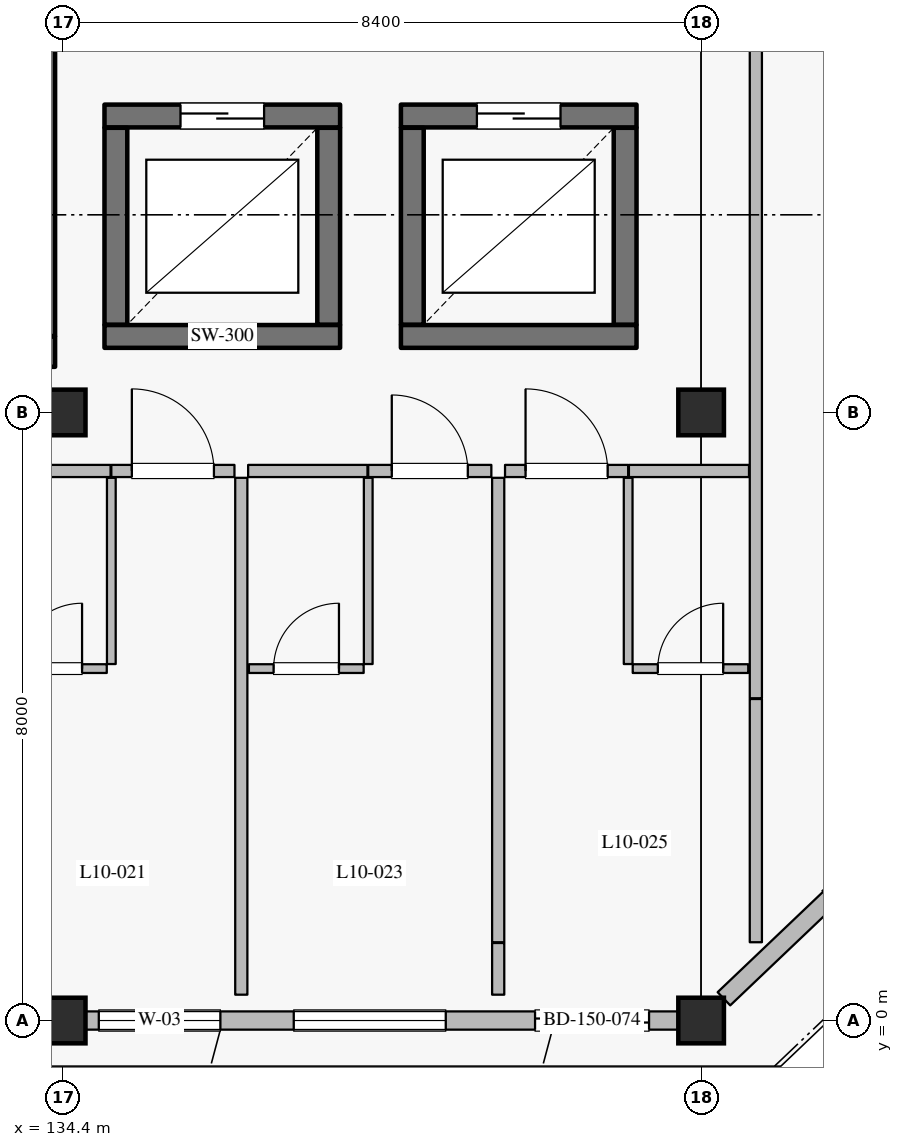
"""IFC4 building model, lengths in metres.
Left out: names, types, materials, properties, quantities, classifications, styles, units other than length and angle.
Written with IfcOpenShell. Run it as: python <this file> out.ifc"""

import sys

from ifc_helpers import new_model, si_unit, direction, frame, frame_2d, origin, origin_2d, place, context, subcontext, project, spatial, rectangle, extrude, element, fill, save


model = new_model("IFC4")
c1 = context("Model", 3, precision=1e-05, world=origin(), true_north=direction((0.0, 1.0)))
c2 = subcontext(c1, "Body", "Model", "MODEL_VIEW")
j1 = project(units=[si_unit("LENGTHUNIT", "METRE"), si_unit("PLANEANGLEUNIT", "RADIAN")], contexts=[c1])
p1 = place(None, origin())
s1 = spatial("IfcSite", under=j1, at=p1, CompositionType="ELEMENT")
p2 = place(p1, origin())
s2 = spatial("IfcBuilding", under=s1, at=p2, CompositionType="ELEMENT")
p3 = place(p2, frame((0.0, 0.0, 43.2)))
s3 = spatial("IfcBuildingStorey", under=s2, at=p3, CompositionType="ELEMENT", Elevation=43.2)
for number, where, z_axis, x_axis in (
    (1, (134.4, 0.0, 0.0), (0.0, 0.0, 1.0), (1.0, 0.0, 0.0)),
    (2, (142.8, 0.0, 0.0), (0.0, 0.0, 1.0), (1.0, 0.0, 0.0)),
    (3, (134.4, 8.0, 0.0), (0.0, 0.0, 1.0), (1.0, 0.0, 0.0)),
    (4, (142.8, 8.0, 0.0), (0.0, 0.0, 1.0), (1.0, 0.0, 0.0)),
):
    element("IfcColumn", number, at=place(p3, frame(where, z_axis=z_axis, x_axis=x_axis)), inside=s3, PredefinedType="COLUMN", context=c2, shape_type="SweptSolid", body=[
        extrude(rectangle(XDim=0.6, YDim=0.6, at=origin_2d()), origin(), (0.0, 0.0, 1.0), 4.2),
    ])
p4 = place(p3, frame((142.5, 0.0, 0.0), z_axis=(0.0, 0.0, 1.0), x_axis=(-1.0, 0.0, 0.0)))
e5 = element("IfcWall", 5, at=p4, inside=s3, PredefinedType="SOLIDWALL", context=c2, shape_type="SweptSolid", body=[
    extrude(rectangle(XDim=7.8, YDim=0.24, at=frame_2d((3.9, 0.0))), origin(), (0.0, 0.0, 1.0), 3.54),
])
p5 = place(p4, frame((0.385, 0.0, 0.0)))
e6 = element("IfcOpeningElement", 6, at=p5, cuts=e5, PredefinedType="OPENING", context=c2, shape_type="SweptSolid", body=[
    extrude(rectangle(XDim=1.5, YDim=2.25, at=frame_2d((0.75, 1.125))), frame((0.0, 0.13, 0.0), z_axis=(0.0, -1.0, 0.0), x_axis=(1.0, 0.0, 0.0)), (0.0, 0.0, 1.0), 0.26),
])
p6 = place(p4, frame((3.06, 0.0, 0.8)))
e7 = element("IfcOpeningElement", 7, at=p6, cuts=e5, PredefinedType="OPENING", context=c2, shape_type="SweptSolid", body=[
    extrude(rectangle(XDim=2.0, YDim=1.75, at=frame_2d((1.0, 0.875))), frame((0.0, 0.13, 0.0), z_axis=(0.0, -1.0, 0.0), x_axis=(1.0, 0.0, 0.0)), (0.0, 0.0, 1.0), 0.26),
])
p7 = place(p4, frame((6.025, 0.0, 0.8)))
e8 = element("IfcOpeningElement", 8, at=p7, cuts=e5, PredefinedType="OPENING", context=c2, shape_type="SweptSolid", body=[
    extrude(rectangle(XDim=1.6, YDim=1.6, at=frame_2d((0.8, 0.8))), frame((0.0, 0.13, 0.0), z_axis=(0.0, -1.0, 0.0), x_axis=(1.0, 0.0, 0.0)), (0.0, 0.0, 1.0), 0.26),
])
p8 = place(p3, frame((150.9, 7.714, 0.0), z_axis=(0.0, 0.0, 1.0), x_axis=(-0.724145477467, -0.689647248573, 0.0)))
e9 = element("IfcWall", 9, at=p8, inside=s3, PredefinedType="SOLIDWALL", context=c2, shape_type="SweptSolid", body=[
    extrude(rectangle(XDim=10.771, YDim=0.24, at=frame_2d((5.385, 0.0))), origin(), (0.0, 0.0, 1.0), 3.54),
])
p9 = place(p8, frame((2.44, 0.0, 0.0)))
e10 = element("IfcOpeningElement", 10, at=p9, cuts=e9, PredefinedType="OPENING", context=c2, shape_type="SweptSolid", body=[
    extrude(rectangle(XDim=1.5, YDim=2.25, at=frame_2d((0.75, 1.125))), frame((0.0, 0.13, 0.0), z_axis=(0.0, -1.0, 0.0), x_axis=(1.0, 0.0, 0.0)), (0.0, 0.0, 1.0), 0.26),
])
p10 = place(p8, frame((6.857, 0.0, 0.8)))
e11 = element("IfcOpeningElement", 11, at=p10, cuts=e9, PredefinedType="OPENING", context=c2, shape_type="SweptSolid", body=[
    extrude(rectangle(XDim=2.0, YDim=1.75, at=frame_2d((1.0, 0.875))), frame((0.0, 0.13, 0.0), z_axis=(0.0, -1.0, 0.0), x_axis=(1.0, 0.0, 0.0)), (0.0, 0.0, 1.0), 0.26),
])
p11 = place(p3, frame((134.95, 9.0, 0.0), z_axis=(0.0, 0.0, 1.0), x_axis=(1.0, 0.0, 0.0)))
e12 = element("IfcWall", 12, at=p11, inside=s3, PredefinedType="SHEAR", context=c2, shape_type="SweptSolid", body=[
    extrude(rectangle(XDim=3.1, YDim=0.3, at=frame_2d((1.55, 0.0))), origin(), (0.0, 0.0, 1.0), 3.935),
])
p12 = place(p3, frame((137.9, 9.155, 0.0), z_axis=(0.0, 0.0, 1.0), x_axis=(0.0, 1.0, 0.0)))
e13 = element("IfcWall", 13, at=p12, inside=s3, PredefinedType="SHEAR", context=c2, shape_type="SweptSolid", body=[
    extrude(rectangle(XDim=2.59, YDim=0.3, at=frame_2d((1.295, 0.0))), origin(), (0.0, 0.0, 1.0), 3.935),
])
p13 = place(p3, frame((138.05, 11.9, 0.0), z_axis=(0.0, 0.0, 1.0), x_axis=(-1.0, 0.0, 0.0)))
e14 = element("IfcWall", 14, at=p13, inside=s3, PredefinedType="SHEAR", context=c2, shape_type="SweptSolid", body=[
    extrude(rectangle(XDim=3.1, YDim=0.3, at=frame_2d((1.55, 0.0))), origin(), (0.0, 0.0, 1.0), 3.935),
])
p14 = place(p13, frame((1.0, 0.0, 0.0)))
e15 = element("IfcOpeningElement", 15, at=p14, cuts=e14, PredefinedType="OPENING", context=c2, shape_type="SweptSolid", body=[
    extrude(rectangle(XDim=1.1, YDim=2.2, at=frame_2d((0.55, 1.1))), frame((0.0, 0.16, 0.0), z_axis=(0.0, -1.0, 0.0), x_axis=(1.0, 0.0, 0.0)), (0.0, 0.0, 1.0), 0.32),
])
p15 = place(p3, frame((135.1, 11.745, 0.0), z_axis=(0.0, 0.0, 1.0), x_axis=(0.0, -1.0, 0.0)))
e16 = element("IfcWall", 16, at=p15, inside=s3, PredefinedType="SHEAR", context=c2, shape_type="SweptSolid", body=[
    extrude(rectangle(XDim=2.59, YDim=0.3, at=frame_2d((1.295, 0.0))), origin(), (0.0, 0.0, 1.0), 3.935),
])
p16 = place(p3, frame((138.85, 9.0, 0.0), z_axis=(0.0, 0.0, 1.0), x_axis=(1.0, 0.0, 0.0)))
e17 = element("IfcWall", 17, at=p16, inside=s3, PredefinedType="SHEAR", context=c2, shape_type="SweptSolid", body=[
    extrude(rectangle(XDim=3.1, YDim=0.3, at=frame_2d((1.55, 0.0))), origin(), (0.0, 0.0, 1.0), 3.935),
])
p17 = place(p3, frame((141.8, 9.155, 0.0), z_axis=(0.0, 0.0, 1.0), x_axis=(0.0, 1.0, 0.0)))
e18 = element("IfcWall", 18, at=p17, inside=s3, PredefinedType="SHEAR", context=c2, shape_type="SweptSolid", body=[
    extrude(rectangle(XDim=2.59, YDim=0.3, at=frame_2d((1.295, 0.0))), origin(), (0.0, 0.0, 1.0), 3.935),
])
p18 = place(p3, frame((141.95, 11.9, 0.0), z_axis=(0.0, 0.0, 1.0), x_axis=(-1.0, 0.0, 0.0)))
e19 = element("IfcWall", 19, at=p18, inside=s3, PredefinedType="SHEAR", context=c2, shape_type="SweptSolid", body=[
    extrude(rectangle(XDim=3.1, YDim=0.3, at=frame_2d((1.55, 0.0))), origin(), (0.0, 0.0, 1.0), 3.935),
])
p19 = place(p18, frame((1.0, 0.0, 0.0)))
e20 = element("IfcOpeningElement", 20, at=p19, cuts=e19, PredefinedType="OPENING", context=c2, shape_type="SweptSolid", body=[
    extrude(rectangle(XDim=1.1, YDim=2.2, at=frame_2d((0.55, 1.1))), frame((0.0, 0.16, 0.0), z_axis=(0.0, -1.0, 0.0), x_axis=(1.0, 0.0, 0.0)), (0.0, 0.0, 1.0), 0.32),
])
p20 = place(p3, frame((139.0, 11.745, 0.0), z_axis=(0.0, 0.0, 1.0), x_axis=(0.0, -1.0, 0.0)))
e21 = element("IfcWall", 21, at=p20, inside=s3, PredefinedType="SHEAR", context=c2, shape_type="SweptSolid", body=[
    extrude(rectangle(XDim=2.59, YDim=0.3, at=frame_2d((1.295, 0.0))), origin(), (0.0, 0.0, 1.0), 3.935),
])
p21 = place(p3, frame((126.15, 8.8, 0.0), z_axis=(0.0, 0.0, 1.0), x_axis=(1.0, 0.0, 0.0)))
e22 = element("IfcWall", 22, at=p21, inside=s3, PredefinedType="SHEAR", context=c2, shape_type="SweptSolid", body=[
    extrude(rectangle(XDim=8.15, YDim=0.4, at=frame_2d((4.075, 0.0))), origin(), (0.0, 0.0, 1.0), 3.935),
])
p22 = place(p3, frame((134.1, 9.005, 0.0), z_axis=(0.0, 0.0, 1.0), x_axis=(0.0, 1.0, 0.0)))
e23 = element("IfcWall", 23, at=p22, inside=s3, PredefinedType="SHEAR", context=c2, shape_type="SweptSolid", body=[
    extrude(rectangle(XDim=3.95, YDim=0.4, at=frame_2d((1.975, 0.0))), origin(), (0.0, 0.0, 1.0), 3.935),
])
p23 = place(p3, frame((133.46, 7.23, 0.0), z_axis=(0.0, 0.0, 1.0), x_axis=(1.0, 0.0, 0.0)))
e24 = element("IfcWall", 24, at=p23, inside=s3, PredefinedType="PARTITIONING", context=c2, shape_type="SweptSolid", body=[
    extrude(rectangle(XDim=1.57, YDim=0.16, at=frame_2d((0.785, 0.0))), origin(), (0.0, 0.0, 1.0), 3.935),
])
p24 = place(p3, frame((135.04, 7.23, 0.0), z_axis=(0.0, 0.0, 1.0), x_axis=(1.0, 0.0, 0.0)))
e25 = element("IfcWall", 25, at=p24, inside=s3, PredefinedType="PARTITIONING", context=c2, shape_type="SweptSolid", body=[
    extrude(rectangle(XDim=1.62, YDim=0.16, at=frame_2d((0.81, 0.0))), origin(), (0.0, 0.0, 1.0), 3.935),
])
p25 = place(p24, frame((0.27, 0.0, 0.0)))
e26 = element("IfcOpeningElement", 26, at=p25, cuts=e25, PredefinedType="OPENING", context=c2, shape_type="SweptSolid", body=[
    extrude(rectangle(XDim=1.08, YDim=2.3, at=frame_2d((0.54, 1.15))), frame((0.0, 0.09, 0.0), z_axis=(0.0, -1.0, 0.0), x_axis=(1.0, 0.0, 0.0)), (0.0, 0.0, 1.0), 0.18),
])
p26 = place(p3, frame((135.04, 4.69, 0.0), z_axis=(0.0, 0.0, 1.0), x_axis=(0.0, 1.0, 0.0)))
e27 = element("IfcWall", 27, at=p26, inside=s3, PredefinedType="PARTITIONING", context=c2, shape_type="SweptSolid", body=[
    extrude(rectangle(XDim=2.45, YDim=0.115, at=frame_2d((1.225, 0.0))), origin(), (0.0, 0.0, 1.0), 3.935),
])
p27 = place(p3, frame((133.47, 4.63, 0.0), z_axis=(0.0, 0.0, 1.0), x_axis=(1.0, 0.0, 0.0)))
e28 = element("IfcWall", 28, at=p27, inside=s3, PredefinedType="PARTITIONING", context=c2, shape_type="SweptSolid", body=[
    extrude(rectangle(XDim=1.51, YDim=0.115, at=frame_2d((0.755, 0.0))), origin(), (0.0, 0.0, 1.0), 3.935),
])
p28 = place(p27, frame((0.325, 0.0, 0.0)))
e29 = element("IfcOpeningElement", 29, at=p28, cuts=e28, PredefinedType="OPENING", context=c2, shape_type="SweptSolid", body=[
    extrude(rectangle(XDim=0.86, YDim=2.12, at=frame_2d((0.43, 1.06))), frame((0.0, 0.067, 0.0), z_axis=(0.0, -1.0, 0.0), x_axis=(1.0, 0.0, 0.0)), (0.0, 0.0, 1.0), 0.135),
])
p29 = place(p3, frame((136.84, 7.23, 0.0), z_axis=(0.0, 0.0, 1.0), x_axis=(1.0, 0.0, 0.0)))
e30 = element("IfcWall", 30, at=p29, inside=s3, PredefinedType="PARTITIONING", context=c2, shape_type="SweptSolid", body=[
    extrude(rectangle(XDim=1.57, YDim=0.16, at=frame_2d((0.785, 0.0))), origin(), (0.0, 0.0, 1.0), 3.935),
])
p30 = place(p3, frame((138.42, 7.23, 0.0), z_axis=(0.0, 0.0, 1.0), x_axis=(1.0, 0.0, 0.0)))
e31 = element("IfcWall", 31, at=p30, inside=s3, PredefinedType="PARTITIONING", context=c2, shape_type="SweptSolid", body=[
    extrude(rectangle(XDim=1.62, YDim=0.16, at=frame_2d((0.81, 0.0))), origin(), (0.0, 0.0, 1.0), 3.935),
])
p31 = place(p30, frame((0.31, 0.0, 0.0)))
e32 = element("IfcOpeningElement", 32, at=p31, cuts=e31, PredefinedType="OPENING", context=c2, shape_type="SweptSolid", body=[
    extrude(rectangle(XDim=1.0, YDim=2.25, at=frame_2d((0.5, 1.125))), frame((0.0, 0.09, 0.0), z_axis=(0.0, -1.0, 0.0), x_axis=(1.0, 0.0, 0.0)), (0.0, 0.0, 1.0), 0.18),
])
p32 = place(p3, frame((138.42, 4.69, 0.0), z_axis=(0.0, 0.0, 1.0), x_axis=(0.0, 1.0, 0.0)))
e33 = element("IfcWall", 33, at=p32, inside=s3, PredefinedType="PARTITIONING", context=c2, shape_type="SweptSolid", body=[
    extrude(rectangle(XDim=2.45, YDim=0.115, at=frame_2d((1.225, 0.0))), origin(), (0.0, 0.0, 1.0), 3.935),
])
p33 = place(p3, frame((136.85, 4.63, 0.0), z_axis=(0.0, 0.0, 1.0), x_axis=(1.0, 0.0, 0.0)))
e34 = element("IfcWall", 34, at=p33, inside=s3, PredefinedType="PARTITIONING", context=c2, shape_type="SweptSolid", body=[
    extrude(rectangle(XDim=1.51, YDim=0.115, at=frame_2d((0.755, 0.0))), origin(), (0.0, 0.0, 1.0), 3.935),
])
p34 = place(p33, frame((0.325, 0.0, 0.0)))
e35 = element("IfcOpeningElement", 35, at=p34, cuts=e34, PredefinedType="OPENING", context=c2, shape_type="SweptSolid", body=[
    extrude(rectangle(XDim=0.86, YDim=2.12, at=frame_2d((0.43, 1.06))), frame((0.0, 0.067, 0.0), z_axis=(0.0, -1.0, 0.0), x_axis=(1.0, 0.0, 0.0)), (0.0, 0.0, 1.0), 0.135),
])
p35 = place(p3, frame((136.75, 0.34, 0.0), z_axis=(0.0, 0.0, 1.0), x_axis=(0.0, 1.0, 0.0)))
e36 = element("IfcWall", 36, at=p35, inside=s3, PredefinedType="PARTITIONING", context=c2, shape_type="SweptSolid", body=[
    extrude(rectangle(XDim=6.8, YDim=0.16, at=frame_2d((3.4, 0.0))), origin(), (0.0, 0.0, 1.0), 3.935),
])
p36 = place(p3, frame((140.13, 0.34, 0.0), z_axis=(0.0, 0.0, 1.0), x_axis=(0.0, 1.0, 0.0)))
e37 = element("IfcWall", 37, at=p36, inside=s3, PredefinedType="PARTITIONING", context=c2, shape_type="SweptSolid", body=[
    extrude(rectangle(XDim=0.68, YDim=0.16, at=frame_2d((0.34, 0.0))), origin(), (0.0, 0.0, 1.0), 3.935),
])
p37 = place(p3, frame((140.22, 7.23, 0.0), z_axis=(0.0, 0.0, 1.0), x_axis=(1.0, 0.0, 0.0)))
e38 = element("IfcWall", 38, at=p37, inside=s3, PredefinedType="PARTITIONING", context=c2, shape_type="SweptSolid", body=[
    extrude(rectangle(XDim=1.62, YDim=0.16, at=frame_2d((0.81, 0.0))), origin(), (0.0, 0.0, 1.0), 3.935),
])
p38 = place(p37, frame((0.27, 0.0, 0.0)))
e39 = element("IfcOpeningElement", 39, at=p38, cuts=e38, PredefinedType="OPENING", context=c2, shape_type="SweptSolid", body=[
    extrude(rectangle(XDim=1.08, YDim=2.3, at=frame_2d((0.54, 1.15))), frame((0.0, 0.09, 0.0), z_axis=(0.0, -1.0, 0.0), x_axis=(1.0, 0.0, 0.0)), (0.0, 0.0, 1.0), 0.18),
])
p39 = place(p3, frame((141.85, 7.23, 0.0), z_axis=(0.0, 0.0, 1.0), x_axis=(1.0, 0.0, 0.0)))
e40 = element("IfcWall", 40, at=p39, inside=s3, PredefinedType="PARTITIONING", context=c2, shape_type="SweptSolid", body=[
    extrude(rectangle(XDim=1.58, YDim=0.16, at=frame_2d((0.79, 0.0))), origin(), (0.0, 0.0, 1.0), 3.935),
])
p40 = place(p3, frame((141.84, 4.69, 0.0), z_axis=(0.0, 0.0, 1.0), x_axis=(0.0, 1.0, 0.0)))
e41 = element("IfcWall", 41, at=p40, inside=s3, PredefinedType="PARTITIONING", context=c2, shape_type="SweptSolid", body=[
    extrude(rectangle(XDim=2.45, YDim=0.115, at=frame_2d((1.225, 0.0))), origin(), (0.0, 0.0, 1.0), 3.935),
])
p41 = place(p3, frame((141.9, 4.63, 0.0), z_axis=(0.0, 0.0, 1.0), x_axis=(1.0, 0.0, 0.0)))
e42 = element("IfcWall", 42, at=p41, inside=s3, PredefinedType="PARTITIONING", context=c2, shape_type="SweptSolid", body=[
    extrude(rectangle(XDim=1.52, YDim=0.115, at=frame_2d((0.76, 0.0))), origin(), (0.0, 0.0, 1.0), 3.935),
])
p42 = place(p41, frame((0.33, 0.0, 0.0)))
e43 = element("IfcOpeningElement", 43, at=p42, cuts=e42, PredefinedType="OPENING", context=c2, shape_type="SweptSolid", body=[
    extrude(rectangle(XDim=0.86, YDim=2.12, at=frame_2d((0.43, 1.06))), frame((0.0, 0.067, 0.0), z_axis=(0.0, -1.0, 0.0), x_axis=(1.0, 0.0, 0.0)), (0.0, 0.0, 1.0), 0.135),
])
p43 = place(p3, frame((140.13, 1.03, 0.0), z_axis=(0.0, 0.0, 1.0), x_axis=(0.0, 1.0, 0.0)))
e44 = element("IfcWall", 44, at=p43, inside=s3, PredefinedType="PARTITIONING", context=c2, shape_type="SweptSolid", body=[
    extrude(rectangle(XDim=6.11, YDim=0.16, at=frame_2d((3.055, 0.0))), origin(), (0.0, 0.0, 1.0), 3.935),
])
p44 = place(p3, frame((143.52, 1.03, 0.0), z_axis=(0.0, 0.0, 1.0), x_axis=(0.0, 1.0, 0.0)))
e45 = element("IfcWall", 45, at=p44, inside=s3, PredefinedType="PARTITIONING", context=c2, shape_type="SweptSolid", body=[
    extrude(rectangle(XDim=3.2, YDim=0.16, at=frame_2d((1.6, 0.0))), origin(), (0.0, 0.0, 1.0), 3.935),
])
p45 = place(p3, frame((143.52, 4.24, 0.0), z_axis=(0.0, 0.0, 1.0), x_axis=(0.0, 1.0, 0.0)))
e46 = element("IfcWall", 46, at=p45, inside=s3, PredefinedType="PARTITIONING", context=c2, shape_type="SweptSolid", body=[
    extrude(rectangle(XDim=9.55, YDim=0.16, at=frame_2d((4.775, 0.0))), origin(), (0.0, 0.0, 1.0), 3.935),
])
p46 = place(p5, origin())
e47 = element("IfcDoor", 47, at=p46, inside=s3, OperationType="SLIDING_TO_LEFT", PredefinedType="DOOR", context=c2, shape_type="SweptSolid", body=[
    extrude(rectangle(XDim=1.5, YDim=2.25, at=frame_2d((0.75, 1.125))), frame((0.0, 0.025, 0.0), z_axis=(0.0, -1.0, 0.0), x_axis=(1.0, 0.0, 0.0)), (0.0, 0.0, 1.0), 0.05),
])
fill(e6, e47)
p47 = place(p6, origin())
e48 = element("IfcWindow", 48, at=p47, inside=s3, PartitioningType="DOUBLE_PANEL_VERTICAL", PredefinedType="WINDOW", context=c2, shape_type="SweptSolid", body=[
    extrude(rectangle(XDim=2.0, YDim=1.75, at=frame_2d((1.0, 0.875))), frame((0.0, 0.03, 0.0), z_axis=(0.0, -1.0, 0.0), x_axis=(1.0, 0.0, 0.0)), (0.0, 0.0, 1.0), 0.06),
])
fill(e7, e48)
p48 = place(p7, origin())
e49 = element("IfcWindow", 49, at=p48, inside=s3, PartitioningType="SINGLE_PANEL", PredefinedType="WINDOW", context=c2, shape_type="SweptSolid", body=[
    extrude(rectangle(XDim=1.6, YDim=1.6, at=frame_2d((0.8, 0.8))), frame((0.0, 0.03, 0.0), z_axis=(0.0, -1.0, 0.0), x_axis=(1.0, 0.0, 0.0)), (0.0, 0.0, 1.0), 0.06),
])
fill(e8, e49)
p49 = place(p14, origin())
e50 = element("IfcDoor", 50, at=p49, inside=s3, OperationType="DOUBLE_DOOR_SLIDING", PredefinedType="DOOR", context=c2, shape_type="SweptSolid", body=[
    extrude(rectangle(XDim=1.1, YDim=2.2, at=frame_2d((0.55, 1.1))), frame((0.0, 0.025, 0.0), z_axis=(0.0, -1.0, 0.0), x_axis=(1.0, 0.0, 0.0)), (0.0, 0.0, 1.0), 0.05),
])
fill(e15, e50)
p50 = place(p19, origin())
e51 = element("IfcDoor", 51, at=p50, inside=s3, OperationType="DOUBLE_DOOR_SLIDING", PredefinedType="DOOR", context=c2, shape_type="SweptSolid", body=[
    extrude(rectangle(XDim=1.1, YDim=2.2, at=frame_2d((0.55, 1.1))), frame((0.0, 0.025, 0.0), z_axis=(0.0, -1.0, 0.0), x_axis=(1.0, 0.0, 0.0)), (0.0, 0.0, 1.0), 0.05),
])
fill(e20, e51)
p51 = place(p25, origin())
e52 = element("IfcDoor", 52, at=p51, inside=s3, OperationType="SINGLE_SWING_LEFT", PredefinedType="DOOR", context=c2, shape_type="SweptSolid", body=[
    extrude(rectangle(XDim=1.08, YDim=2.3, at=frame_2d((0.54, 1.15))), frame((0.0, 0.025, 0.0), z_axis=(0.0, -1.0, 0.0), x_axis=(1.0, 0.0, 0.0)), (0.0, 0.0, 1.0), 0.05),
])
fill(e26, e52)
p52 = place(p28, origin())
e53 = element("IfcDoor", 53, at=p52, inside=s3, OperationType="SINGLE_SWING_RIGHT", PredefinedType="DOOR", context=c2, shape_type="SweptSolid", body=[
    extrude(rectangle(XDim=0.86, YDim=2.12, at=frame_2d((0.43, 1.06))), frame((0.0, 0.025, 0.0), z_axis=(0.0, -1.0, 0.0), x_axis=(1.0, 0.0, 0.0)), (0.0, 0.0, 1.0), 0.05),
])
fill(e29, e53)
p53 = place(p31, origin())
e54 = element("IfcDoor", 54, at=p53, inside=s3, OperationType="SINGLE_SWING_LEFT", PredefinedType="DOOR", context=c2, shape_type="SweptSolid", body=[
    extrude(rectangle(XDim=1.0, YDim=2.25, at=frame_2d((0.5, 1.125))), frame((0.0, 0.025, 0.0), z_axis=(0.0, -1.0, 0.0), x_axis=(1.0, 0.0, 0.0)), (0.0, 0.0, 1.0), 0.05),
])
fill(e32, e54)
p54 = place(p34, origin())
e55 = element("IfcDoor", 55, at=p54, inside=s3, OperationType="SINGLE_SWING_RIGHT", PredefinedType="DOOR", context=c2, shape_type="SweptSolid", body=[
    extrude(rectangle(XDim=0.86, YDim=2.12, at=frame_2d((0.43, 1.06))), frame((0.0, 0.025, 0.0), z_axis=(0.0, -1.0, 0.0), x_axis=(1.0, 0.0, 0.0)), (0.0, 0.0, 1.0), 0.05),
])
fill(e35, e55)
p55 = place(p38, origin())
e56 = element("IfcDoor", 56, at=p55, inside=s3, OperationType="SINGLE_SWING_LEFT", PredefinedType="DOOR", context=c2, shape_type="SweptSolid", body=[
    extrude(rectangle(XDim=1.08, YDim=2.3, at=frame_2d((0.54, 1.15))), frame((0.0, 0.025, 0.0), z_axis=(0.0, -1.0, 0.0), x_axis=(1.0, 0.0, 0.0)), (0.0, 0.0, 1.0), 0.05),
])
fill(e39, e56)
p56 = place(p42, origin())
e57 = element("IfcDoor", 57, at=p56, inside=s3, OperationType="SINGLE_SWING_RIGHT", PredefinedType="DOOR", context=c2, shape_type="SweptSolid", body=[
    extrude(rectangle(XDim=0.86, YDim=2.12, at=frame_2d((0.43, 1.06))), frame((0.0, 0.025, 0.0), z_axis=(0.0, -1.0, 0.0), x_axis=(1.0, 0.0, 0.0)), (0.0, 0.0, 1.0), 0.05),
])
fill(e43, e57)
save(model, sys.argv[1])
